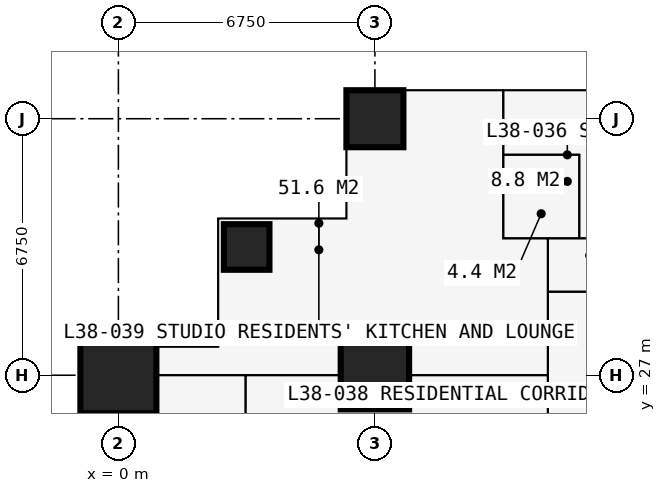
"""IFC4 building model, lengths in metres.
Left out: names, types, materials, properties, quantities, classifications, styles, units other than length and angle.
Written with IfcOpenShell. Run it as: python <this file> out.ifc"""

import sys

from ifc_helpers import new_model, si_unit, direction, frame, frame_2d, origin, origin_2d, place, context, subcontext, project, spatial, rectangle, extrude, element, fill, save


model = new_model("IFC4")
c1 = context("Model", 3, precision=1e-05, world=origin(), true_north=direction((0.0, 1.0)))
c2 = subcontext(c1, "Body", "Model", "MODEL_VIEW")
j1 = project(units=[si_unit("LENGTHUNIT", "METRE"), si_unit("PLANEANGLEUNIT", "RADIAN")], contexts=[c1])
p1 = place(None, origin())
s1 = spatial("IfcSite", under=j1, at=p1, CompositionType="ELEMENT")
p2 = place(p1, origin())
s2 = spatial("IfcBuilding", under=s1, at=p2, CompositionType="ELEMENT")
p3 = place(p2, frame((0.0, 0.0, 142.2)))
s3 = spatial("IfcBuildingStorey", under=s2, at=p3, CompositionType="ELEMENT", Elevation=142.2)
p4 = place(p3, frame((0.0, 27.0, 0.0), z_axis=(0.0, 0.0, 1.0), x_axis=(1.0, 0.0, 0.0)))
e1 = element("IfcColumn", 1, at=p4, inside=s3, PredefinedType="COLUMN", context=c2, shape_type="SweptSolid", body=[
    extrude(rectangle(XDim=2.0, YDim=2.0, at=origin_2d()), origin(), (0.0, 0.0, 1.0), 3.6),
])
p5 = place(p3, frame((3.375, 30.375, 0.0), z_axis=(0.0, 0.0, 1.0), x_axis=(1.0, 0.0, 0.0)))
e2 = element("IfcColumn", 2, at=p5, inside=s3, PredefinedType="COLUMN", context=c2, shape_type="SweptSolid", body=[
    extrude(rectangle(XDim=1.2, YDim=1.2, at=origin_2d()), origin(), (0.0, 0.0, 1.0), 3.6),
])
p6 = place(p3, frame((6.75, 27.0, 0.0), z_axis=(0.0, 0.0, 1.0), x_axis=(1.0, 0.0, 0.0)))
e3 = element("IfcColumn", 3, at=p6, inside=s3, PredefinedType="COLUMN", context=c2, shape_type="SweptSolid", body=[
    extrude(rectangle(XDim=1.8, YDim=1.8, at=origin_2d()), origin(), (0.0, 0.0, 1.0), 3.6),
])
p7 = place(p3, frame((6.75, 33.75, 0.0), z_axis=(0.0, 0.0, 1.0), x_axis=(1.0, 0.0, 0.0)))
e4 = element("IfcColumn", 4, at=p7, inside=s3, PredefinedType="COLUMN", context=c2, shape_type="SweptSolid", body=[
    extrude(rectangle(XDim=1.5, YDim=1.5, at=origin_2d()), origin(), (0.0, 0.0, 1.0), 3.6),
])
p8 = place(p3, frame((6.0, 34.5, 0.0), z_axis=(0.0, 0.0, 1.0), x_axis=(0.0, -1.0, 0.0)))
e5 = element("IfcWall", 5, at=p8, inside=s3, PredefinedType="SOLIDWALL", context=c2, shape_type="SweptSolid", body=[
    extrude(rectangle(XDim=3.375, YDim=0.3, at=frame_2d((1.688, 0.0))), origin(), (0.0, 0.0, 1.0), 3.375),
])
p9 = place(p8, frame((1.607, 0.0, 0.9)))
e6 = element("IfcOpeningElement", 6, at=p9, cuts=e5, PredefinedType="OPENING", context=c2, shape_type="SweptSolid", body=[
    extrude(rectangle(XDim=1.5, YDim=1.8, at=frame_2d((0.75, 0.9))), frame((0.0, 0.16, 0.0), z_axis=(0.0, -1.0, 0.0), x_axis=(1.0, 0.0, 0.0)), (0.0, 0.0, 1.0), 0.32),
])
p10 = place(p3, frame((6.0, 31.125, 0.0), z_axis=(0.0, 0.0, 1.0), x_axis=(-1.0, 0.0, 0.0)))
e7 = element("IfcWall", 7, at=p10, inside=s3, PredefinedType="SOLIDWALL", context=c2, shape_type="SweptSolid", body=[
    extrude(rectangle(XDim=3.375, YDim=0.3, at=frame_2d((1.688, 0.0))), origin(), (0.0, 0.0, 1.0), 3.375),
])
p11 = place(p10, frame((0.788, 0.0, 0.6)))
e8 = element("IfcOpeningElement", 8, at=p11, cuts=e7, PredefinedType="OPENING", context=c2, shape_type="SweptSolid", body=[
    extrude(rectangle(XDim=1.8, YDim=2.1, at=frame_2d((0.9, 1.05))), frame((0.0, 0.16, 0.0), z_axis=(0.0, -1.0, 0.0), x_axis=(1.0, 0.0, 0.0)), (0.0, 0.0, 1.0), 0.32),
])
p12 = place(p3, frame((2.625, 31.125, 0.0), z_axis=(0.0, 0.0, 1.0), x_axis=(0.0, -1.0, 0.0)))
e9 = element("IfcWall", 9, at=p12, inside=s3, PredefinedType="SOLIDWALL", context=c2, shape_type="SweptSolid", body=[
    extrude(rectangle(XDim=3.375, YDim=0.3, at=frame_2d((1.688, 0.0))), origin(), (0.0, 0.0, 1.0), 3.375),
])
p13 = place(p12, frame((0.788, 0.0, 0.6)))
e10 = element("IfcOpeningElement", 10, at=p13, cuts=e9, PredefinedType="OPENING", context=c2, shape_type="SweptSolid", body=[
    extrude(rectangle(XDim=1.8, YDim=2.1, at=frame_2d((0.9, 1.05))), frame((0.0, 0.16, 0.0), z_axis=(0.0, -1.0, 0.0), x_axis=(1.0, 0.0, 0.0)), (0.0, 0.0, 1.0), 0.32),
])
p14 = place(p3, frame((2.625, 27.75, 0.0), z_axis=(0.0, 0.0, 1.0), x_axis=(-1.0, 0.0, 0.0)))
e11 = element("IfcWall", 11, at=p14, inside=s3, PredefinedType="SOLIDWALL", context=c2, shape_type="SweptSolid", body=[
    extrude(rectangle(XDim=3.375, YDim=0.3, at=frame_2d((1.688, 0.0))), origin(), (0.0, 0.0, 1.0), 3.375),
])
p15 = place(p14, frame((0.292, 0.0, 0.9)))
e12 = element("IfcOpeningElement", 12, at=p15, cuts=e11, PredefinedType="OPENING", context=c2, shape_type="SweptSolid", body=[
    extrude(rectangle(XDim=1.2, YDim=1.8, at=frame_2d((0.6, 0.9))), frame((0.0, 0.16, 0.0), z_axis=(0.0, -1.0, 0.0), x_axis=(1.0, 0.0, 0.0)), (0.0, 0.0, 1.0), 0.32),
])
p16 = place(p3, frame((-0.734, 27.0, 0.0), z_axis=(0.0, 0.0, 1.0), x_axis=(1.0, 0.0, 0.0)))
e13 = element("IfcWall", 13, at=p16, inside=s3, PredefinedType="PARTITIONING", context=c2, shape_type="SweptSolid", body=[
    extrude(rectangle(XDim=12.034, YDim=0.15, at=frame_2d((6.017, 0.0))), origin(), (0.0, 0.0, 1.0), 2.806),
])
p17 = place(p3, frame((3.35, 10.125, 0.0), z_axis=(0.0, 0.0, 1.0), x_axis=(0.0, 1.0, 0.0)))
e14 = element("IfcWall", 14, at=p17, inside=s3, PredefinedType="PARTITIONING", context=c2, shape_type="SweptSolid", body=[
    extrude(rectangle(XDim=16.875, YDim=0.15, at=frame_2d((8.438, 0.0))), origin(), (0.0, 0.0, 1.0), 3.375),
])
p18 = place(p17, frame((7.575, 0.0, 0.0)))
e15 = element("IfcOpeningElement", 15, at=p18, cuts=e14, PredefinedType="OPENING", context=c2, shape_type="SweptSolid", body=[
    extrude(rectangle(XDim=0.95, YDim=2.2, at=frame_2d((0.475, 1.1))), frame((0.0, 0.085, 0.0), z_axis=(0.0, -1.0, 0.0), x_axis=(1.0, 0.0, 0.0)), (0.0, 0.0, 1.0), 0.17),
])
p19 = place(p17, frame((14.325, 0.0, 0.0)))
e16 = element("IfcOpeningElement", 16, at=p19, cuts=e14, PredefinedType="OPENING", context=c2, shape_type="SweptSolid", body=[
    extrude(rectangle(XDim=0.95, YDim=2.2, at=frame_2d((0.475, 1.1))), frame((0.0, 0.085, 0.0), z_axis=(0.0, -1.0, 0.0), x_axis=(1.0, 0.0, 0.0)), (0.0, 0.0, 1.0), 0.17),
])
p20 = place(p17, frame((0.2, 0.0, 0.0)))
e17 = element("IfcOpeningElement", 17, at=p20, cuts=e14, PredefinedType="OPENING", context=c2, shape_type="SweptSolid", body=[
    extrude(rectangle(XDim=0.95, YDim=2.2, at=frame_2d((0.475, 1.1))), frame((0.0, 0.085, 0.0), z_axis=(0.0, -1.0, 0.0), x_axis=(1.0, 0.0, 0.0)), (0.0, 0.0, 1.0), 0.17),
])
p21 = place(p3, frame((10.125, 30.6, 0.0), z_axis=(0.0, 0.0, 1.0), x_axis=(0.0, 1.0, 0.0)))
e18 = element("IfcWall", 18, at=p21, inside=s3, PredefinedType="PARTITIONING", context=c2, shape_type="SweptSolid", body=[
    extrude(rectangle(XDim=3.884, YDim=0.1, at=frame_2d((1.942, 0.0))), origin(), (0.0, 0.0, 1.0), 3.375),
])
p22 = place(p3, frame((10.125, 30.6, 0.0), z_axis=(0.0, 0.0, 1.0), x_axis=(1.0, 0.0, 0.0)))
e19 = element("IfcWall", 19, at=p22, inside=s3, PredefinedType="PARTITIONING", context=c2, shape_type="SweptSolid", body=[
    extrude(rectangle(XDim=3.375, YDim=0.1, at=frame_2d((1.688, 0.0))), origin(), (0.0, 0.0, 1.0), 3.375),
])
p23 = place(p22, frame((2.2, 0.0, 0.0)))
e20 = element("IfcOpeningElement", 20, at=p23, cuts=e19, PredefinedType="OPENING", context=c2, shape_type="SweptSolid", body=[
    extrude(rectangle(XDim=0.95, YDim=2.2, at=frame_2d((0.475, 1.1))), frame((0.0, 0.06, 0.0), z_axis=(0.0, -1.0, 0.0), x_axis=(1.0, 0.0, 0.0)), (0.0, 0.0, 1.0), 0.12),
])
p24 = place(p3, frame((10.125, 32.8, 0.0), z_axis=(0.0, 0.0, 1.0), x_axis=(1.0, 0.0, 0.0)))
e21 = element("IfcWall", 21, at=p24, inside=s3, PredefinedType="PARTITIONING", context=c2, shape_type="SweptSolid", body=[
    extrude(rectangle(XDim=2.0, YDim=0.1, at=frame_2d((1.0, 0.0))), origin(), (0.0, 0.0, 1.0), 3.375),
])
p25 = place(p3, frame((11.3, 11.3, 0.0), z_axis=(0.0, 0.0, 1.0), x_axis=(0.0, 1.0, 0.0)))
e22 = element("IfcWall", 22, at=p25, inside=s3, PredefinedType="PARTITIONING", context=c2, shape_type="SweptSolid", body=[
    extrude(rectangle(XDim=19.3, YDim=0.15, at=frame_2d((9.65, 0.0))), origin(), (0.0, 0.0, 1.0), 3.375),
])
p26 = place(p25, frame((18.1, 0.0, 0.0)))
e23 = element("IfcOpeningElement", 23, at=p26, cuts=e22, PredefinedType="OPENING", context=c2, shape_type="SweptSolid", body=[
    extrude(rectangle(XDim=1.0, YDim=2.2, at=frame_2d((0.5, 1.1))), frame((0.0, 0.085, 0.0), z_axis=(0.0, -1.0, 0.0), x_axis=(1.0, 0.0, 0.0)), (0.0, 0.0, 1.0), 0.17),
])
p27 = place(p25, frame((12.137, 0.0, 0.0)))
e24 = element("IfcOpeningElement", 24, at=p27, cuts=e22, PredefinedType="OPENING", context=c2, shape_type="SweptSolid", body=[
    extrude(rectangle(XDim=1.0, YDim=2.2, at=frame_2d((0.5, 1.1))), frame((0.0, 0.085, 0.0), z_axis=(0.0, -1.0, 0.0), x_axis=(1.0, 0.0, 0.0)), (0.0, 0.0, 1.0), 0.17),
])
p28 = place(p3, frame((11.3, 29.2, 0.0), z_axis=(0.0, 0.0, 1.0), x_axis=(1.0, 0.0, 0.0)))
e25 = element("IfcWall", 25, at=p28, inside=s3, PredefinedType="PARTITIONING", context=c2, shape_type="SweptSolid", body=[
    extrude(rectangle(XDim=19.809, YDim=0.15, at=frame_2d((9.904, 0.0))), origin(), (0.0, 0.0, 1.0), 3.375),
])
p29 = place(p28, frame((12.9, 0.0, 0.0)))
e26 = element("IfcOpeningElement", 26, at=p29, cuts=e25, PredefinedType="OPENING", context=c2, shape_type="SweptSolid", body=[
    extrude(rectangle(XDim=1.0, YDim=2.2, at=frame_2d((0.5, 1.1))), frame((0.0, 0.085, 0.0), z_axis=(0.0, -1.0, 0.0), x_axis=(1.0, 0.0, 0.0)), (0.0, 0.0, 1.0), 0.17),
])
p30 = place(p28, frame((6.4, 0.0, 0.0)))
e27 = element("IfcOpeningElement", 27, at=p30, cuts=e25, PredefinedType="OPENING", context=c2, shape_type="SweptSolid", body=[
    extrude(rectangle(XDim=0.95, YDim=2.2, at=frame_2d((0.475, 1.1))), frame((0.0, 0.085, 0.0), z_axis=(0.0, -1.0, 0.0), x_axis=(1.0, 0.0, 0.0)), (0.0, 0.0, 1.0), 0.17),
])
p31 = place(p28, frame((0.6, 0.0, 0.0)))
e28 = element("IfcOpeningElement", 28, at=p31, cuts=e25, PredefinedType="OPENING", context=c2, shape_type="SweptSolid", body=[
    extrude(rectangle(XDim=1.0, YDim=2.2, at=frame_2d((0.5, 1.1))), frame((0.0, 0.085, 0.0), z_axis=(0.0, -1.0, 0.0), x_axis=(1.0, 0.0, 0.0)), (0.0, 0.0, 1.0), 0.17),
])
p32 = place(p3, frame((12.125, 30.6, 0.0), z_axis=(0.0, 0.0, 1.0), x_axis=(0.0, 1.0, 0.0)))
e29 = element("IfcWall", 29, at=p32, inside=s3, PredefinedType="PARTITIONING", context=c2, shape_type="SweptSolid", body=[
    extrude(rectangle(XDim=2.2, YDim=0.1, at=frame_2d((1.1, 0.0))), origin(), (0.0, 0.0, 1.0), 3.375),
])
p33 = place(p32, frame((0.65, 0.0, 0.0)))
e30 = element("IfcOpeningElement", 30, at=p33, cuts=e29, PredefinedType="OPENING", context=c2, shape_type="SweptSolid", body=[
    extrude(rectangle(XDim=0.9, YDim=2.2, at=frame_2d((0.45, 1.1))), frame((0.0, 0.06, 0.0), z_axis=(0.0, -1.0, 0.0), x_axis=(1.0, 0.0, 0.0)), (0.0, 0.0, 1.0), 0.12),
])
p34 = place(p9, origin())
e31 = element("IfcWindow", 31, at=p34, inside=s3, PartitioningType="SINGLE_PANEL", PredefinedType="WINDOW", context=c2, shape_type="SweptSolid", body=[
    extrude(rectangle(XDim=1.5, YDim=1.8, at=frame_2d((0.75, 0.9))), frame((0.0, 0.03, 0.0), z_axis=(0.0, -1.0, 0.0), x_axis=(1.0, 0.0, 0.0)), (0.0, 0.0, 1.0), 0.06),
])
fill(e6, e31)
p35 = place(p11, origin())
e32 = element("IfcWindow", 32, at=p35, inside=s3, PartitioningType="SINGLE_PANEL", PredefinedType="WINDOW", context=c2, shape_type="SweptSolid", body=[
    extrude(rectangle(XDim=1.8, YDim=2.1, at=frame_2d((0.9, 1.05))), frame((0.0, 0.03, 0.0), z_axis=(0.0, -1.0, 0.0), x_axis=(1.0, 0.0, 0.0)), (0.0, 0.0, 1.0), 0.06),
])
fill(e8, e32)
p36 = place(p13, origin())
e33 = element("IfcWindow", 33, at=p36, inside=s3, PartitioningType="SINGLE_PANEL", PredefinedType="WINDOW", context=c2, shape_type="SweptSolid", body=[
    extrude(rectangle(XDim=1.8, YDim=2.1, at=frame_2d((0.9, 1.05))), frame((0.0, 0.03, 0.0), z_axis=(0.0, -1.0, 0.0), x_axis=(1.0, 0.0, 0.0)), (0.0, 0.0, 1.0), 0.06),
])
fill(e10, e33)
p37 = place(p15, origin())
e34 = element("IfcWindow", 34, at=p37, inside=s3, PartitioningType="SINGLE_PANEL", PredefinedType="WINDOW", context=c2, shape_type="SweptSolid", body=[
    extrude(rectangle(XDim=1.2, YDim=1.8, at=frame_2d((0.6, 0.9))), frame((0.0, 0.03, 0.0), z_axis=(0.0, -1.0, 0.0), x_axis=(1.0, 0.0, 0.0)), (0.0, 0.0, 1.0), 0.06),
])
fill(e12, e34)
p38 = place(p33, origin())
e35 = element("IfcDoor", 35, at=p38, inside=s3, OperationType="SINGLE_SWING_RIGHT", PredefinedType="DOOR", context=c2, shape_type="SweptSolid", body=[
    extrude(rectangle(XDim=0.9, YDim=2.2, at=frame_2d((0.45, 1.1))), frame((0.0, 0.025, 0.0), z_axis=(0.0, -1.0, 0.0), x_axis=(1.0, 0.0, 0.0)), (0.0, 0.0, 1.0), 0.05),
])
fill(e30, e35)
p39 = place(p31, origin())
e36 = element("IfcDoor", 36, at=p39, inside=s3, OperationType="SINGLE_SWING_LEFT", PredefinedType="DOOR", context=c2, shape_type="SweptSolid", body=[
    extrude(rectangle(XDim=1.0, YDim=2.2, at=frame_2d((0.5, 1.1))), frame((0.0, 0.025, 0.0), z_axis=(0.0, -1.0, 0.0), x_axis=(1.0, 0.0, 0.0)), (0.0, 0.0, 1.0), 0.05),
])
fill(e28, e36)
p40 = place(p26, origin())
e37 = element("IfcDoor", 37, at=p40, inside=s3, OperationType="SINGLE_SWING_LEFT", PredefinedType="DOOR", context=c2, shape_type="SweptSolid", body=[
    extrude(rectangle(XDim=1.0, YDim=2.2, at=frame_2d((0.5, 1.1))), frame((0.0, 0.025, 0.0), z_axis=(0.0, -1.0, 0.0), x_axis=(1.0, 0.0, 0.0)), (0.0, 0.0, 1.0), 0.05),
])
fill(e23, e37)
save(model, sys.argv[1])
